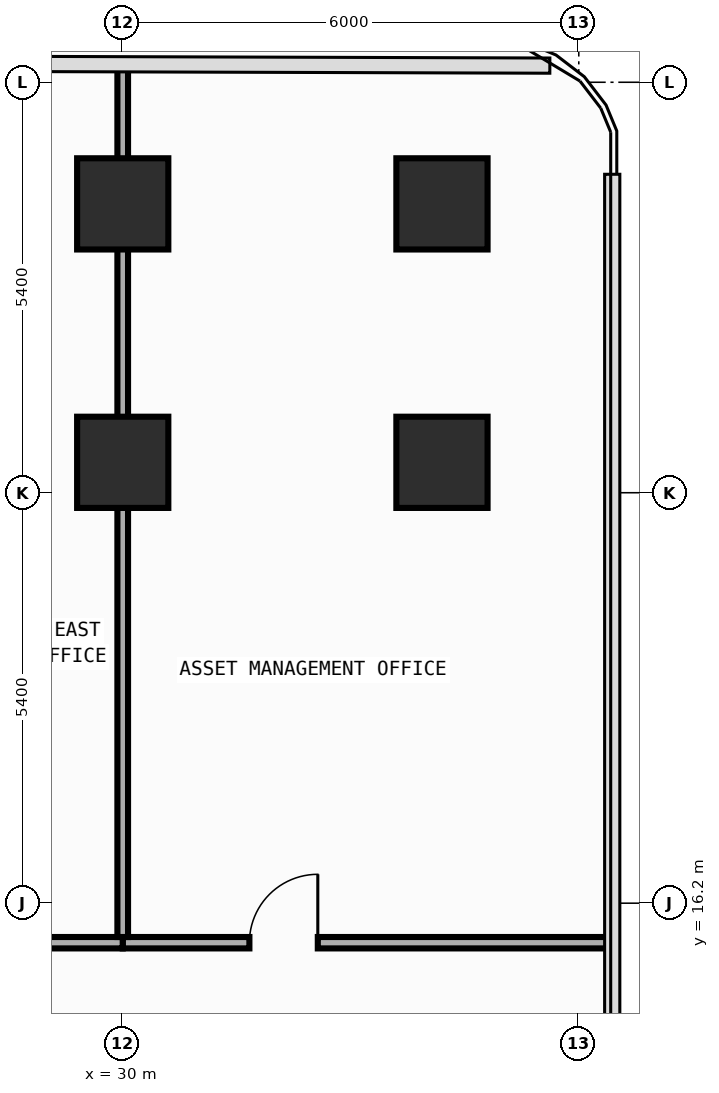
"""IFC4 building model, lengths in metres.
Left out: names, types, materials, properties, quantities, classifications, styles, units other than length and angle.
Written with IfcOpenShell. Run it as: python <this file> out.ifc"""

import sys

from ifc_helpers import new_model, si_unit, direction, frame, frame_2d, origin, origin_2d, place, context, subcontext, project, spatial, rectangle, extrude, element, fill, save


model = new_model("IFC4")
c1 = context("Model", 3, precision=1e-05, world=origin(), true_north=direction((0.0, 1.0)))
c2 = subcontext(c1, "Body", "Model", "MODEL_VIEW")
j1 = project(units=[si_unit("LENGTHUNIT", "METRE"), si_unit("PLANEANGLEUNIT", "RADIAN")], contexts=[c1])
p1 = place(None, origin())
s1 = spatial("IfcSite", under=j1, at=p1, CompositionType="ELEMENT")
p2 = place(p1, origin())
s2 = spatial("IfcBuilding", under=s1, at=p2, CompositionType="ELEMENT")
p3 = place(p2, frame((0.0, 0.0, 6.0)))
s3 = spatial("IfcBuildingStorey", under=s2, at=p3, CompositionType="ELEMENT", Elevation=6.0)
for number, where, z_axis, x_axis in (
    (1, (30.0, 22.0, 0.0), (0.0, 0.0, 1.0), (1.0, 0.0, 0.0)),
    (2, (30.0, 25.4, 0.0), (0.0, 0.0, 1.0), (1.0, 0.0, 0.0)),
    (3, (34.2, 22.0, 0.0), (0.0, 0.0, 1.0), (1.0, 0.0, 0.0)),
    (4, (34.2, 25.4, 0.0), (0.0, 0.0, 1.0), (1.0, 0.0, 0.0)),
):
    element("IfcColumn", number, at=place(p3, frame(where, z_axis=z_axis, x_axis=x_axis)), inside=s3, PredefinedType="COLUMN", context=c2, shape_type="SweptSolid", body=[
        extrude(rectangle(XDim=1.2, YDim=1.2, at=origin_2d()), origin(), (0.0, 0.0, 1.0), 5.0),
    ])
p4 = place(p3, frame((30.0, 15.68, 0.0), z_axis=(0.0, 0.0, 1.0), x_axis=(1.0, 0.0, 0.0)))
e5 = element("IfcWall", 5, at=p4, inside=s3, PredefinedType="PARTITIONING", context=c2, shape_type="SweptSolid", body=[
    extrude(rectangle(XDim=6.445, YDim=0.15, at=frame_2d((3.223, 0.0))), origin(), (0.0, 0.0, 1.0), 4.7),
])
p5 = place(p4, frame((1.667, 0.0, 0.0)))
e6 = element("IfcOpeningElement", 6, at=p5, cuts=e5, PredefinedType="OPENING", context=c2, shape_type="SweptSolid", body=[
    extrude(rectangle(XDim=0.9, YDim=2.15, at=frame_2d((0.45, 1.075))), frame((0.0, 0.085, 0.0), z_axis=(0.0, -1.0, 0.0), x_axis=(1.0, 0.0, 0.0)), (0.0, 0.0, 1.0), 0.17),
])
p6 = place(p3, frame((27.355, 15.68, 0.0), z_axis=(0.0, 0.0, 1.0), x_axis=(1.0, 0.0, 0.0)))
e7 = element("IfcWall", 7, at=p6, inside=s3, PredefinedType="PARTITIONING", context=c2, shape_type="SweptSolid", body=[
    extrude(rectangle(XDim=2.645, YDim=0.15, at=frame_2d((1.323, 0.0))), origin(), (0.0, 0.0, 1.0), 4.7),
])
p7 = place(p6, frame((0.46, 0.0, 0.0)))
e8 = element("IfcOpeningElement", 8, at=p7, cuts=e7, PredefinedType="OPENING", context=c2, shape_type="SweptSolid", body=[
    extrude(rectangle(XDim=0.9, YDim=2.15, at=frame_2d((0.45, 1.075))), frame((0.0, 0.085, 0.0), z_axis=(0.0, -1.0, 0.0), x_axis=(1.0, 0.0, 0.0)), (0.0, 0.0, 1.0), 0.17),
])
p8 = place(p3, frame((30.0, 15.755, 0.0), z_axis=(0.0, 0.0, 1.0), x_axis=(0.0, 1.0, 0.0)))
e9 = element("IfcWall", 9, at=p8, inside=s3, PredefinedType="PARTITIONING", context=c2, shape_type="SweptSolid", body=[
    extrude(rectangle(XDim=11.486, YDim=0.14, at=frame_2d((5.743, 0.0))), origin(), (0.0, 0.0, 1.0), 3.8),
])
p9 = place(p5, origin())
e10 = element("IfcDoor", 10, at=p9, inside=s3, OperationType="SINGLE_SWING_RIGHT", PredefinedType="DOOR", context=c2, shape_type="SweptSolid", body=[
    extrude(rectangle(XDim=0.9, YDim=2.15, at=frame_2d((0.45, 1.075))), frame((0.0, 0.025, 0.0), z_axis=(0.0, -1.0, 0.0), x_axis=(1.0, 0.0, 0.0)), (0.0, 0.0, 1.0), 0.05),
])
fill(e6, e10)
save(model, sys.argv[1])
